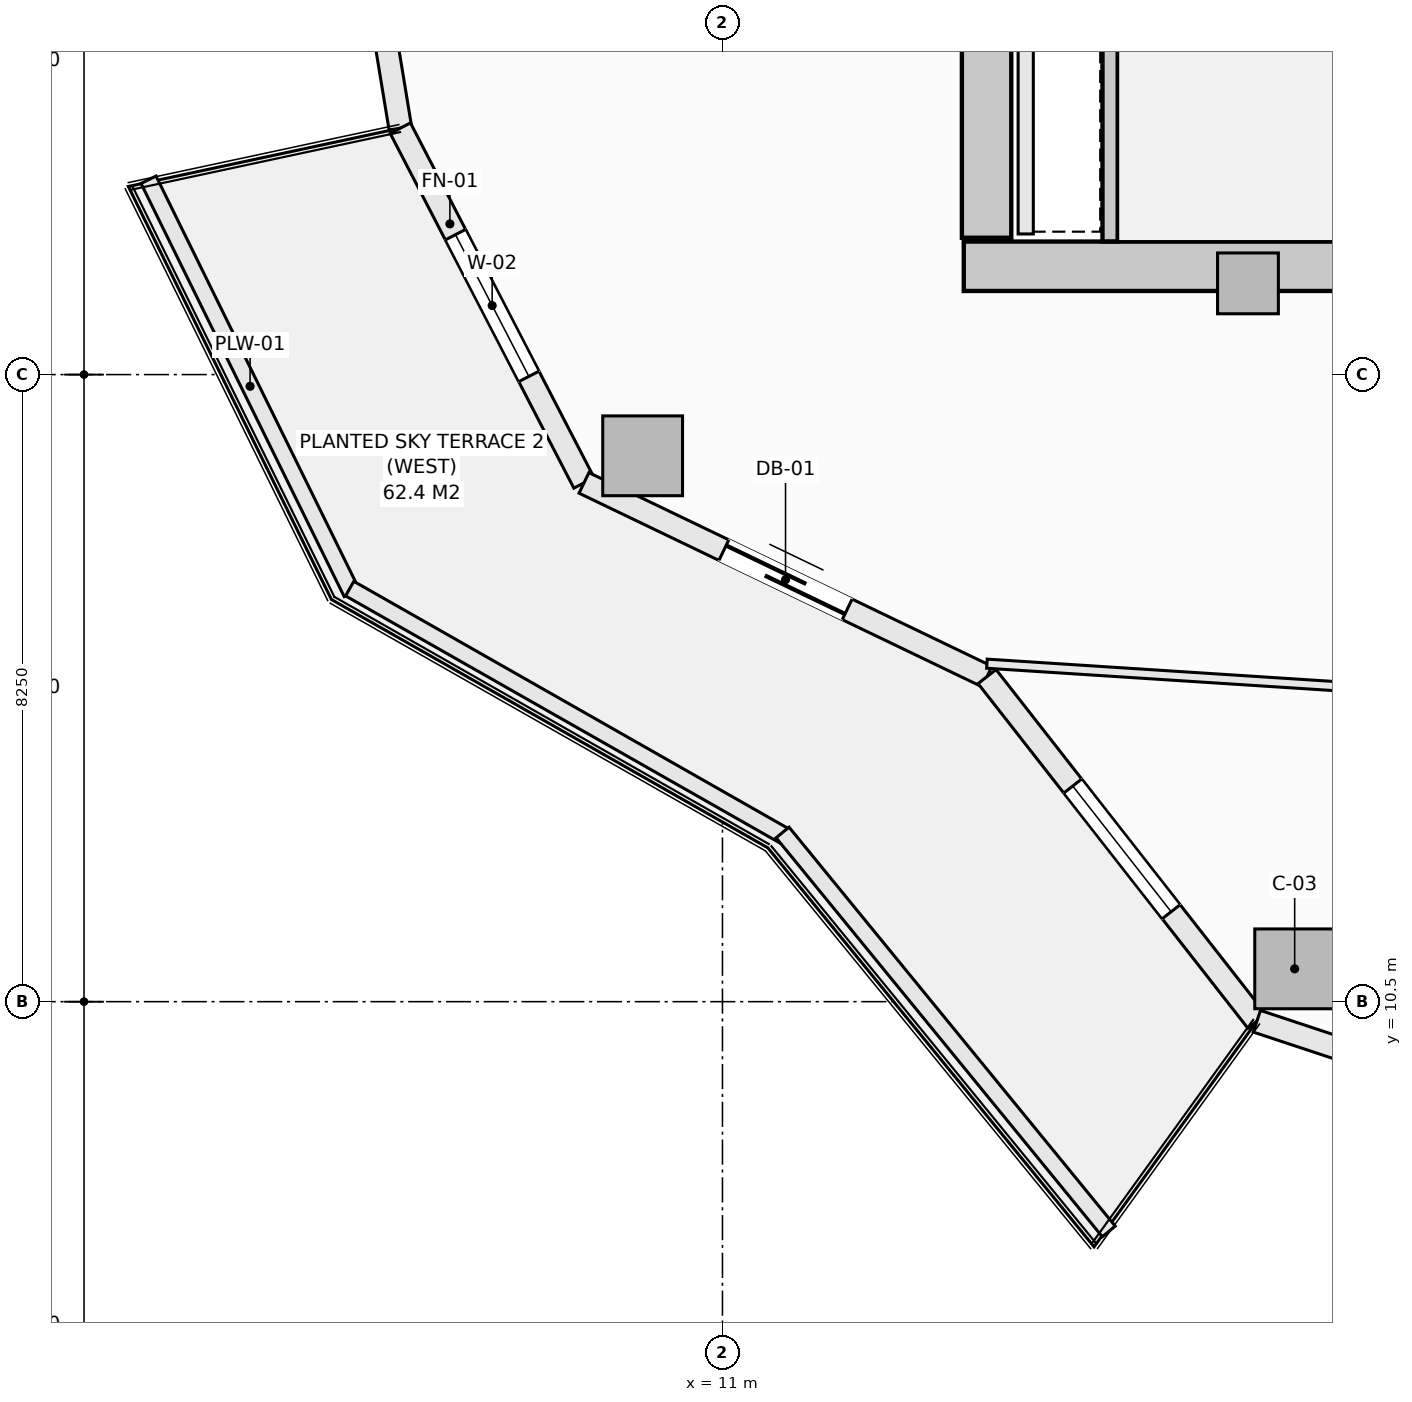
"""IFC4 building model, lengths in metres.
Left out: names, types, materials, properties, quantities, classifications, styles, units other than length and angle.
Written with IfcOpenShell. Run it as: python <this file> out.ifc"""

import sys

from ifc_helpers import new_model, si_unit, direction, frame, frame_2d, origin, origin_2d, place, context, subcontext, project, spatial, rectangle, extrude, element, fill, save


model = new_model("IFC4")
c1 = context("Model", 3, precision=1e-05, world=origin(), true_north=direction((0.0, 1.0)))
c2 = subcontext(c1, "Body", "Model", "MODEL_VIEW")
j1 = project(units=[si_unit("LENGTHUNIT", "METRE"), si_unit("PLANEANGLEUNIT", "RADIAN")], contexts=[c1])
p1 = place(None, origin())
s1 = spatial("IfcSite", under=j1, at=p1, CompositionType="ELEMENT")
p2 = place(p1, origin())
s2 = spatial("IfcBuilding", under=s1, at=p2, CompositionType="ELEMENT")
p3 = place(p2, frame((0.0, 0.0, 129.1)))
s3 = spatial("IfcBuildingStorey", under=s2, at=p3, CompositionType="ELEMENT", Elevation=129.1)
p4 = place(p3, frame((14.175, 20.175, -0.27), z_axis=(0.0, 0.0, 1.0), x_axis=(1.0, 0.0, 0.0)))
e1 = element("IfcWall", 1, at=p4, inside=s3, PredefinedType="SHEAR", context=c2, shape_type="SweptSolid", body=[
    extrude(rectangle(XDim=13.65, YDim=0.65, at=frame_2d((6.825, 0.0))), origin(), (0.0, 0.0, 1.0), 3.4),
])
p5 = place(p3, frame((14.475, 20.55, -0.27), z_axis=(0.0, 0.0, 1.0), x_axis=(0.0, 1.0, 0.0)))
e2 = element("IfcWall", 2, at=p5, inside=s3, PredefinedType="SHEAR", context=c2, shape_type="SweptSolid", body=[
    extrude(rectangle(XDim=12.9, YDim=0.65, at=frame_2d((6.45, 0.0))), origin(), (0.0, 0.0, 1.0), 3.4),
])
for number, where, z_axis, x_axis in (
    (3, (9.95, 17.681, -0.27), (0.0, 0.0, 1.0), (1.0, 0.0, 0.0)),
    (4, (18.529, 10.932, -0.27), (0.0, 0.0, 1.0), (1.0, 0.0, 0.0)),
):
    element("IfcColumn", number, at=place(p3, frame(where, z_axis=z_axis, x_axis=x_axis)), inside=s3, PredefinedType="COLUMN", context=c2, shape_type="SweptSolid", body=[
        extrude(rectangle(XDim=1.05, YDim=1.05, at=origin_2d()), origin(), (0.0, 0.0, 1.0), 3.4),
    ])
p6 = place(p3, frame((17.914, 19.95, -0.27), z_axis=(0.0, 0.0, 1.0), x_axis=(1.0, 0.0, 0.0)))
e5 = element("IfcColumn", 5, at=p6, inside=s3, PredefinedType="PILASTER", context=c2, shape_type="SweptSolid", body=[
    extrude(rectangle(XDim=0.8, YDim=0.8, at=origin_2d()), origin(), (0.0, 0.0, 1.0), 3.4),
])
p7 = place(p3, frame((5.938, 27.0, 0.0), z_axis=(0.0, 0.0, 1.0), x_axis=(0.162393944769, -0.986726003864, 0.0)))
e6 = element("IfcWall", 6, at=p7, inside=s3, PredefinedType="SOLIDWALL", context=c2, shape_type="SweptSolid", body=[
    extrude(rectangle(XDim=5.075, YDim=0.3, at=frame_2d((2.538, 0.0))), origin(), (0.0, 0.0, 1.0), 2.653),
])
p8 = place(p7, frame((1.488, 0.0, 0.74)))
e7 = element("IfcOpeningElement", 7, at=p8, cuts=e6, PredefinedType="OPENING", context=c2, shape_type="SweptSolid", body=[
    extrude(rectangle(XDim=2.1, YDim=1.7, at=frame_2d((1.05, 0.85))), frame((0.0, 0.16, 0.0), z_axis=(0.0, -1.0, 0.0), x_axis=(1.0, 0.0, 0.0)), (0.0, 0.0, 1.0), 0.32),
])
p9 = place(p3, frame((6.762, 21.992, 0.0), z_axis=(0.0, 0.0, 1.0), x_axis=(0.459767899643, -0.888039119892, 0.0)))
e8 = element("IfcWall", 8, at=p9, inside=s3, PredefinedType="SOLIDWALL", context=c2, shape_type="SweptSolid", body=[
    extrude(rectangle(XDim=5.255, YDim=0.3, at=frame_2d((2.628, 0.0))), origin(), (0.0, 0.0, 1.0), 2.653),
])
p10 = place(p9, frame((1.578, 0.0, 0.74)))
e9 = element("IfcOpeningElement", 9, at=p10, cuts=e8, PredefinedType="OPENING", context=c2, shape_type="SweptSolid", body=[
    extrude(rectangle(XDim=2.1, YDim=1.7, at=frame_2d((1.05, 0.85))), frame((0.0, 0.16, 0.0), z_axis=(0.0, -1.0, 0.0), x_axis=(1.0, 0.0, 0.0)), (0.0, 0.0, 1.0), 0.32),
])
p11 = place(p3, frame((9.178, 17.325, 0.0), z_axis=(0.0, 0.0, 1.0), x_axis=(0.901370184739, -0.433049408339, 0.0)))
e10 = element("IfcWall", 10, at=p11, inside=s3, PredefinedType="SOLIDWALL", context=c2, shape_type="SweptSolid", body=[
    extrude(rectangle(XDim=5.884, YDim=0.3, at=frame_2d((2.942, 0.0))), origin(), (0.0, 0.0, 1.0), 2.653),
])
p12 = place(p11, frame((2.042, 0.0, 0.0)))
e11 = element("IfcOpeningElement", 11, at=p12, cuts=e10, PredefinedType="OPENING", context=c2, shape_type="SweptSolid", body=[
    extrude(rectangle(XDim=1.8, YDim=2.25, at=frame_2d((0.9, 1.125))), frame((0.0, 0.16, 0.0), z_axis=(0.0, -1.0, 0.0), x_axis=(1.0, 0.0, 0.0)), (0.0, 0.0, 1.0), 0.32),
])
p13 = place(p3, frame((14.481, 14.777, 0.0), z_axis=(0.0, 0.0, 1.0), x_axis=(0.616435134162, -0.787405693001, 0.0)))
e12 = element("IfcWall", 12, at=p13, inside=s3, PredefinedType="SOLIDWALL", context=c2, shape_type="SweptSolid", body=[
    extrude(rectangle(XDim=5.759, YDim=0.3, at=frame_2d((2.879, 0.0))), origin(), (0.0, 0.0, 1.0), 2.653),
])
p14 = place(p13, frame((1.829, 0.0, 0.74)))
e13 = element("IfcOpeningElement", 13, at=p14, cuts=e12, PredefinedType="OPENING", context=c2, shape_type="SweptSolid", body=[
    extrude(rectangle(XDim=2.1, YDim=1.7, at=frame_2d((1.05, 0.85))), frame((0.0, 0.16, 0.0), z_axis=(0.0, -1.0, 0.0), x_axis=(1.0, 0.0, 0.0)), (0.0, 0.0, 1.0), 0.32),
])
p15 = place(p3, frame((18.031, 10.242, 0.0), z_axis=(0.0, 0.0, 1.0), x_axis=(0.949238009374, -0.314558741032, 0.0)))
e14 = element("IfcWall", 14, at=p15, inside=s3, PredefinedType="SOLIDWALL", context=c2, shape_type="SweptSolid", body=[
    extrude(rectangle(XDim=6.146, YDim=0.3, at=frame_2d((3.073, 0.0))), origin(), (0.0, 0.0, 1.0), 2.653),
])
p16 = place(p15, frame((1.83, 0.0, 0.74)))
e15 = element("IfcOpeningElement", 15, at=p16, cuts=e14, PredefinedType="OPENING", context=c2, shape_type="SweptSolid", body=[
    extrude(rectangle(XDim=1.2, YDim=1.7, at=frame_2d((0.6, 0.85))), frame((0.0, 0.16, 0.0), z_axis=(0.0, -1.0, 0.0), x_axis=(1.0, 0.0, 0.0)), (0.0, 0.0, 1.0), 0.32),
])
p17 = place(p15, frame((3.369, 0.0, 0.74)))
e16 = element("IfcOpeningElement", 16, at=p17, cuts=e14, PredefinedType="OPENING", context=c2, shape_type="SweptSolid", body=[
    extrude(rectangle(XDim=1.2, YDim=1.7, at=frame_2d((0.6, 0.85))), frame((0.0, 0.16, 0.0), z_axis=(0.0, -1.0, 0.0), x_axis=(1.0, 0.0, 0.0)), (0.0, 0.0, 1.0), 0.32),
])
p18 = place(p3, frame((3.449, 21.313, 0.0), z_axis=(0.0, 0.0, 1.0), x_axis=(0.441269631716, -0.897374566235, 0.0)))
e17 = element("IfcWall", 17, at=p18, inside=s3, PredefinedType="PARAPET", context=c2, shape_type="SweptSolid", body=[
    extrude(rectangle(XDim=6.056, YDim=0.22, at=frame_2d((3.028, 0.0))), origin(), (0.0, 0.0, 1.0), 0.52),
])
p19 = place(p3, frame((6.095, 15.934, 0.0), z_axis=(0.0, 0.0, 1.0), x_axis=(0.869187658335, -0.494482370361, 0.0)))
e18 = element("IfcWall", 18, at=p19, inside=s3, PredefinedType="PARAPET", context=c2, shape_type="SweptSolid", body=[
    extrude(rectangle(XDim=6.606, YDim=0.22, at=frame_2d((3.303, 0.0))), origin(), (0.0, 0.0, 1.0), 0.52),
])
p20 = place(p3, frame((11.791, 12.726, 0.0), z_axis=(0.0, 0.0, 1.0), x_axis=(0.633002467947, -0.77414977593, 0.0)))
e19 = element("IfcWall", 19, at=p20, inside=s3, PredefinedType="PARAPET", context=c2, shape_type="SweptSolid", body=[
    extrude(rectangle(XDim=6.78, YDim=0.22, at=frame_2d((3.39, 0.0))), origin(), (0.0, 0.0, 1.0), 0.52),
])
p21 = place(p3, frame((16.1, 20.502, -0.27), z_axis=(0.0, 0.0, 1.0), x_axis=(0.0, 1.0, 0.0)))
e20 = element("IfcWall", 20, at=p21, inside=s3, PredefinedType="SHEAR", context=c2, shape_type="SweptSolid", body=[
    extrude(rectangle(XDim=3.036, YDim=0.2, at=frame_2d((1.518, 0.0))), origin(), (0.0, 0.0, 1.0), 3.4),
])
p22 = place(p3, frame((14.99, 20.6, 0.0), z_axis=(0.0, 0.0, 1.0), x_axis=(0.0, 1.0, 0.0)))
e21 = element("IfcWall", 21, at=p22, inside=s3, PredefinedType="SOLIDWALL", context=c2, shape_type="SweptSolid", body=[
    extrude(rectangle(XDim=2.85, YDim=0.2, at=frame_2d((1.425, 0.0))), origin(), (0.0, 0.0, 1.0), 3.13),
])
p23 = place(p3, frame((14.479, 14.947, 0.0), z_axis=(0.0, 0.0, 1.0), x_axis=(0.997930277746, -0.064305215633, 0.0)))
e22 = element("IfcWall", 22, at=p23, inside=s3, PredefinedType="PARTITIONING", context=c2, shape_type="SweptSolid", body=[
    extrude(rectangle(XDim=12.62, YDim=0.12, at=frame_2d((6.31, 0.0))), origin(), (0.0, 0.0, 1.0), 2.812),
])
p24 = place(p10, origin())
e23 = element("IfcWindow", 23, at=p24, inside=s3, PartitioningType="SINGLE_PANEL", PredefinedType="WINDOW", context=c2, shape_type="SweptSolid", body=[
    extrude(rectangle(XDim=2.1, YDim=1.7, at=frame_2d((1.05, 0.85))), frame((0.0, 0.03, 0.0), z_axis=(0.0, -1.0, 0.0), x_axis=(1.0, 0.0, 0.0)), (0.0, 0.0, 1.0), 0.06),
])
fill(e9, e23)
p25 = place(p12, frame((1.8, 0.0, 0.0), z_axis=(0.0, 0.0, 1.0), x_axis=(-1.0, 0.0, 0.0)))
e24 = element("IfcDoor", 24, at=p25, inside=s3, OperationType="SLIDING_TO_LEFT", PredefinedType="DOOR", context=c2, shape_type="SweptSolid", body=[
    extrude(rectangle(XDim=1.8, YDim=2.25, at=frame_2d((0.9, 1.125))), frame((0.0, 0.025, 0.0), z_axis=(0.0, -1.0, 0.0), x_axis=(1.0, 0.0, 0.0)), (0.0, 0.0, 1.0), 0.05),
])
fill(e11, e24)
p26 = place(p14, origin())
e25 = element("IfcWindow", 25, at=p26, inside=s3, PartitioningType="SINGLE_PANEL", PredefinedType="WINDOW", context=c2, shape_type="SweptSolid", body=[
    extrude(rectangle(XDim=2.1, YDim=1.7, at=frame_2d((1.05, 0.85))), frame((0.0, 0.03, 0.0), z_axis=(0.0, -1.0, 0.0), x_axis=(1.0, 0.0, 0.0)), (0.0, 0.0, 1.0), 0.06),
])
fill(e13, e25)
save(model, sys.argv[1])
